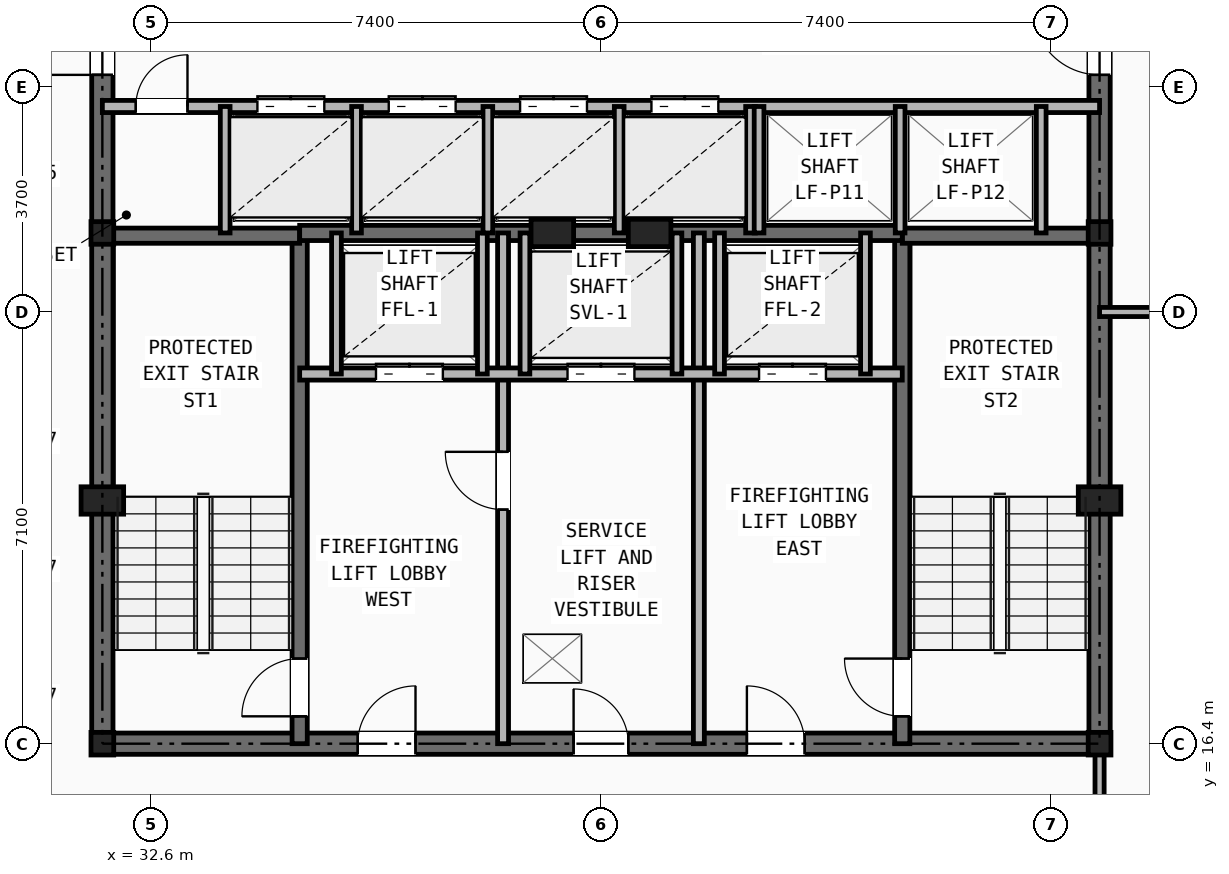
"""IFC4 building model, lengths in metres.
Left out: names, types, materials, properties, quantities, classifications, styles, units other than length and angle.
Written with IfcOpenShell. Run it as: python <this file> out.ifc"""

import sys

from ifc_helpers import new_model, si_unit, direction, frame, frame_2d, origin, origin_2d, place, context, subcontext, project, spatial, rectangle, i_section, extrude, element, fill, save


model = new_model("IFC4")
c1 = context("Model", 3, precision=1e-05, world=origin(), true_north=direction((0.0, 1.0)))
c2 = subcontext(c1, "Body", "Model", "MODEL_VIEW")
j1 = project(units=[si_unit("LENGTHUNIT", "METRE"), si_unit("PLANEANGLEUNIT", "RADIAN")], contexts=[c1])
p1 = place(None, origin())
s1 = spatial("IfcSite", under=j1, at=p1, CompositionType="ELEMENT")
p2 = place(p1, origin())
s2 = spatial("IfcBuilding", under=s1, at=p2, CompositionType="ELEMENT")
p3 = place(p2, frame((0.0, 0.0, 147.05)))
s3 = spatial("IfcBuildingStorey", under=s2, at=p3, CompositionType="ELEMENT", Elevation=147.05)
for number, where, z_axis, x_axis in (
    (1, (31.8, 16.4, 0.0), (0.0, 0.0, 1.0), (1.0, 0.0, 0.0)),
    (2, (48.2, 16.4, 0.0), (0.0, 0.0, 1.0), (1.0, 0.0, 0.0)),
    (3, (31.8, 24.8, 0.0), (0.0, 0.0, 1.0), (1.0, 0.0, 0.0)),
    (4, (48.2, 24.8, 0.0), (0.0, 0.0, 1.0), (1.0, 0.0, 0.0)),
):
    element("IfcColumn", number, at=place(p3, frame(where, z_axis=z_axis, x_axis=x_axis)), inside=s3, PredefinedType="COLUMN", context=c2, shape_type="SweptSolid", body=[
        extrude(i_section(OverallWidth=0.374, OverallDepth=0.372, WebThickness=0.016, FlangeThickness=0.026, at=origin_2d()), origin(), (0.0, 0.0, 1.0), 3.45),
    ])
for number, where, z_axis, x_axis in (
    (5, (31.8, 20.4, 0.0), (0.0, 0.0, 1.0), (1.0, 0.0, 0.0)),
    (6, (48.2, 20.4, 0.0), (0.0, 0.0, 1.0), (1.0, 0.0, 0.0)),
    (7, (39.2, 24.8, 0.0), (0.0, 0.0, 1.0), (1.0, 0.0, 0.0)),
    (8, (40.8, 24.8, 0.0), (0.0, 0.0, 1.0), (1.0, 0.0, 0.0)),
):
    element("IfcColumn", number, at=place(p3, frame(where, z_axis=z_axis, x_axis=x_axis)), inside=s3, PredefinedType="PILASTER", context=c2, shape_type="SweptSolid", body=[
        extrude(rectangle(XDim=0.7, YDim=0.45, at=origin_2d()), origin(), (0.0, 0.0, 1.0), 3.45),
    ])
p4 = place(p3, frame((31.8, 16.4, 0.0), z_axis=(0.0, 0.0, 1.0), x_axis=(1.0, 0.0, 0.0)))
e9 = element("IfcWall", 9, at=p4, inside=s3, PredefinedType="SHEAR", context=c2, shape_type="SweptSolid", body=[
    extrude(rectangle(XDim=16.4, YDim=0.35, at=frame_2d((8.2, 0.0))), origin(), (0.0, 0.0, 1.0), 3.21),
])
p5 = place(p4, frame((7.75, 0.0, 0.0)))
e10 = element("IfcOpeningElement", 10, at=p5, cuts=e9, PredefinedType="OPENING", context=c2, shape_type="SweptSolid", body=[
    extrude(rectangle(XDim=0.9, YDim=2.1, at=frame_2d((0.45, 1.05))), frame((0.0, 0.185, 0.0), z_axis=(0.0, -1.0, 0.0), x_axis=(1.0, 0.0, 0.0)), (0.0, 0.0, 1.0), 0.37),
])
p6 = place(p4, frame((4.2, 0.0, 0.0)))
e11 = element("IfcOpeningElement", 11, at=p6, cuts=e9, PredefinedType="OPENING", context=c2, shape_type="SweptSolid", body=[
    extrude(rectangle(XDim=0.95, YDim=2.1, at=frame_2d((0.475, 1.05))), frame((0.0, 0.185, 0.0), z_axis=(0.0, -1.0, 0.0), x_axis=(1.0, 0.0, 0.0)), (0.0, 0.0, 1.0), 0.37),
])
p7 = place(p4, frame((10.6, 0.0, 0.0)))
e12 = element("IfcOpeningElement", 12, at=p7, cuts=e9, PredefinedType="OPENING", context=c2, shape_type="SweptSolid", body=[
    extrude(rectangle(XDim=0.95, YDim=2.1, at=frame_2d((0.475, 1.05))), frame((0.0, 0.185, 0.0), z_axis=(0.0, -1.0, 0.0), x_axis=(1.0, 0.0, 0.0)), (0.0, 0.0, 1.0), 0.37),
])
p8 = place(p3, frame((31.8, 16.4, 0.0), z_axis=(0.0, 0.0, 1.0), x_axis=(0.0, 1.0, 0.0)))
e13 = element("IfcWall", 13, at=p8, inside=s3, PredefinedType="SHEAR", context=c2, shape_type="SweptSolid", body=[
    extrude(rectangle(XDim=14.8, YDim=0.35, at=frame_2d((7.4, 0.0))), origin(), (0.0, 0.0, 1.0), 3.21),
])
p9 = place(p8, frame((11.0, 0.0, 0.0)))
e14 = element("IfcOpeningElement", 14, at=p9, cuts=e13, PredefinedType="OPENING", context=c2, shape_type="SweptSolid", body=[
    extrude(rectangle(XDim=1.1, YDim=2.15, at=frame_2d((0.55, 1.075))), frame((0.0, 0.185, 0.0), z_axis=(0.0, -1.0, 0.0), x_axis=(1.0, 0.0, 0.0)), (0.0, 0.0, 1.0), 0.37),
])
p10 = place(p3, frame((48.2, 16.4, 0.0), z_axis=(0.0, 0.0, 1.0), x_axis=(0.0, 1.0, 0.0)))
e15 = element("IfcWall", 15, at=p10, inside=s3, PredefinedType="SHEAR", context=c2, shape_type="SweptSolid", body=[
    extrude(rectangle(XDim=14.8, YDim=0.35, at=frame_2d((7.4, 0.0))), origin(), (0.0, 0.0, 1.0), 3.21),
])
p11 = place(p10, frame((11.0, 0.0, 0.0)))
e16 = element("IfcOpeningElement", 16, at=p11, cuts=e15, PredefinedType="OPENING", context=c2, shape_type="SweptSolid", body=[
    extrude(rectangle(XDim=1.1, YDim=2.15, at=frame_2d((0.55, 1.075))), frame((0.0, 0.185, 0.0), z_axis=(0.0, -1.0, 0.0), x_axis=(1.0, 0.0, 0.0)), (0.0, 0.0, 1.0), 0.37),
])
p12 = place(p3, frame((35.045, 16.4, 0.0), z_axis=(0.0, 0.0, 1.0), x_axis=(0.0, 1.0, 0.0)))
e17 = element("IfcWall", 17, at=p12, inside=s3, PredefinedType="SHEAR", context=c2, shape_type="SweptSolid", body=[
    extrude(rectangle(XDim=8.4, YDim=0.25, at=frame_2d((4.2, 0.0))), origin(), (0.0, 0.0, 1.0), 3.21),
])
p13 = place(p12, frame((0.45, 0.0, 0.0)))
e18 = element("IfcOpeningElement", 18, at=p13, cuts=e17, PredefinedType="OPENING", context=c2, shape_type="SweptSolid", body=[
    extrude(rectangle(XDim=0.95, YDim=2.1, at=frame_2d((0.475, 1.05))), frame((0.0, 0.135, 0.0), z_axis=(0.0, -1.0, 0.0), x_axis=(1.0, 0.0, 0.0)), (0.0, 0.0, 1.0), 0.27),
])
p14 = place(p3, frame((31.8, 24.755, 0.0), z_axis=(0.0, 0.0, 1.0), x_axis=(1.0, 0.0, 0.0)))
e19 = element("IfcWall", 19, at=p14, inside=s3, PredefinedType="SHEAR", context=c2, shape_type="SweptSolid", body=[
    extrude(rectangle(XDim=3.245, YDim=0.25, at=frame_2d((1.623, 0.0))), origin(), (0.0, 0.0, 1.0), 3.21),
])
p15 = place(p3, frame((44.955, 16.4, 0.0), z_axis=(0.0, 0.0, 1.0), x_axis=(0.0, 1.0, 0.0)))
e20 = element("IfcWall", 20, at=p15, inside=s3, PredefinedType="SHEAR", context=c2, shape_type="SweptSolid", body=[
    extrude(rectangle(XDim=8.4, YDim=0.25, at=frame_2d((4.2, 0.0))), origin(), (0.0, 0.0, 1.0), 3.21),
])
p16 = place(p15, frame((0.45, 0.0, 0.0)))
e21 = element("IfcOpeningElement", 21, at=p16, cuts=e20, PredefinedType="OPENING", context=c2, shape_type="SweptSolid", body=[
    extrude(rectangle(XDim=0.95, YDim=2.1, at=frame_2d((0.475, 1.05))), frame((0.0, 0.135, 0.0), z_axis=(0.0, -1.0, 0.0), x_axis=(1.0, 0.0, 0.0)), (0.0, 0.0, 1.0), 0.27),
])
p17 = place(p3, frame((44.955, 24.755, 0.0), z_axis=(0.0, 0.0, 1.0), x_axis=(1.0, 0.0, 0.0)))
e22 = element("IfcWall", 22, at=p17, inside=s3, PredefinedType="SHEAR", context=c2, shape_type="SweptSolid", body=[
    extrude(rectangle(XDim=3.245, YDim=0.25, at=frame_2d((1.623, 0.0))), origin(), (0.0, 0.0, 1.0), 3.21),
])
p18 = place(p3, frame((35.045, 24.8, 0.0), z_axis=(0.0, 0.0, 1.0), x_axis=(1.0, 0.0, 0.0)))
e23 = element("IfcWall", 23, at=p18, inside=s3, PredefinedType="SHEAR", context=c2, shape_type="SweptSolid", body=[
    extrude(rectangle(XDim=9.91, YDim=0.25, at=frame_2d((4.955, 0.0))), origin(), (0.0, 0.0, 1.0), 3.21),
])
p19 = place(p3, frame((38.39, 16.4, 0.0), z_axis=(0.0, 0.0, 1.0), x_axis=(0.0, 1.0, 0.0)))
e24 = element("IfcWall", 24, at=p19, inside=s3, PredefinedType="PARTITIONING", context=c2, shape_type="SweptSolid", body=[
    extrude(rectangle(XDim=8.4, YDim=0.18, at=frame_2d((4.2, 0.0))), origin(), (0.0, 0.0, 1.0), 2.661),
])
p20 = place(p19, frame((3.85, 0.0, 0.0)))
e25 = element("IfcOpeningElement", 25, at=p20, cuts=e24, PredefinedType="OPENING", context=c2, shape_type="SweptSolid", body=[
    extrude(rectangle(XDim=0.95, YDim=2.1, at=frame_2d((0.475, 1.05))), frame((0.0, 0.1, 0.0), z_axis=(0.0, -1.0, 0.0), x_axis=(1.0, 0.0, 0.0)), (0.0, 0.0, 1.0), 0.2),
])
p21 = place(p3, frame((41.61, 16.4, 0.0), z_axis=(0.0, 0.0, 1.0), x_axis=(0.0, 1.0, 0.0)))
e26 = element("IfcWall", 26, at=p21, inside=s3, PredefinedType="PARTITIONING", context=c2, shape_type="SweptSolid", body=[
    extrude(rectangle(XDim=8.4, YDim=0.18, at=frame_2d((4.2, 0.0))), origin(), (0.0, 0.0, 1.0), 2.661),
])
p22 = place(p3, frame((35.045, 22.48, 0.0), z_axis=(0.0, 0.0, 1.0), x_axis=(1.0, 0.0, 0.0)))
e27 = element("IfcWall", 27, at=p22, inside=s3, PredefinedType="SOLIDWALL", context=c2, shape_type="SweptSolid", body=[
    extrude(rectangle(XDim=9.91, YDim=0.2, at=frame_2d((4.955, 0.0))), origin(), (0.0, 0.0, 1.0), 3.21),
])
p23 = place(p22, frame((1.255, 0.0, 0.0)))
e28 = element("IfcOpeningElement", 28, at=p23, cuts=e27, PredefinedType="OPENING", context=c2, shape_type="SweptSolid", body=[
    extrude(rectangle(XDim=1.1, YDim=2.15, at=frame_2d((0.55, 1.075))), frame((0.0, 0.11, 0.0), z_axis=(0.0, -1.0, 0.0), x_axis=(1.0, 0.0, 0.0)), (0.0, 0.0, 1.0), 0.22),
])
p24 = place(p22, frame((7.555, 0.0, 0.0)))
e29 = element("IfcOpeningElement", 29, at=p24, cuts=e27, PredefinedType="OPENING", context=c2, shape_type="SweptSolid", body=[
    extrude(rectangle(XDim=1.1, YDim=2.15, at=frame_2d((0.55, 1.075))), frame((0.0, 0.11, 0.0), z_axis=(0.0, -1.0, 0.0), x_axis=(1.0, 0.0, 0.0)), (0.0, 0.0, 1.0), 0.22),
])
p25 = place(p22, frame((4.405, 0.0, 0.0)))
e30 = element("IfcOpeningElement", 30, at=p25, cuts=e27, PredefinedType="OPENING", context=c2, shape_type="SweptSolid", body=[
    extrude(rectangle(XDim=1.1, YDim=2.15, at=frame_2d((0.55, 1.075))), frame((0.0, 0.11, 0.0), z_axis=(0.0, -1.0, 0.0), x_axis=(1.0, 0.0, 0.0)), (0.0, 0.0, 1.0), 0.22),
])
for number, where, z_axis, x_axis in (
    (31, (35.65, 22.48, 0.0), (0.0, 0.0, 1.0), (0.0, 1.0, 0.0)),
    (32, (38.05, 22.48, 0.0), (0.0, 0.0, 1.0), (0.0, 1.0, 0.0)),
    (33, (41.95, 22.48, 0.0), (0.0, 0.0, 1.0), (0.0, 1.0, 0.0)),
    (34, (44.35, 22.48, 0.0), (0.0, 0.0, 1.0), (0.0, 1.0, 0.0)),
    (35, (38.75, 22.48, 0.0), (0.0, 0.0, 1.0), (0.0, 1.0, 0.0)),
    (36, (41.25, 22.48, 0.0), (0.0, 0.0, 1.0), (0.0, 1.0, 0.0)),
):
    element("IfcWall", number, at=place(p3, frame(where, z_axis=z_axis, x_axis=x_axis)), inside=s3, PredefinedType="SOLIDWALL", context=c2, shape_type="SweptSolid", body=[
        extrude(rectangle(XDim=2.32, YDim=0.16, at=frame_2d((1.16, 0.0))), origin(), (0.0, 0.0, 1.0), 3.21),
    ])
p26 = place(p3, frame((31.8, 26.88, 0.0), z_axis=(0.0, 0.0, 1.0), x_axis=(1.0, 0.0, 0.0)))
e37 = element("IfcWall", 37, at=p26, inside=s3, PredefinedType="SOLIDWALL", context=c2, shape_type="SweptSolid", body=[
    extrude(rectangle(XDim=16.4, YDim=0.2, at=frame_2d((8.2, 0.0))), origin(), (0.0, 0.0, 1.0), 2.661),
])
p27 = place(p26, frame((0.55, 0.0, 0.0)))
e38 = element("IfcOpeningElement", 38, at=p27, cuts=e37, PredefinedType="OPENING", context=c2, shape_type="SweptSolid", body=[
    extrude(rectangle(XDim=0.85, YDim=2.05, at=frame_2d((0.425, 1.025))), frame((0.0, 0.11, 0.0), z_axis=(0.0, -1.0, 0.0), x_axis=(1.0, 0.0, 0.0)), (0.0, 0.0, 1.0), 0.22),
])
p28 = place(p26, frame((2.55, 0.0, 0.0)))
e39 = element("IfcOpeningElement", 39, at=p28, cuts=e37, PredefinedType="OPENING", context=c2, shape_type="SweptSolid", body=[
    extrude(rectangle(XDim=1.1, YDim=2.15, at=frame_2d((0.55, 1.075))), frame((0.0, 0.11, 0.0), z_axis=(0.0, -1.0, 0.0), x_axis=(1.0, 0.0, 0.0)), (0.0, 0.0, 1.0), 0.22),
])
p29 = place(p26, frame((4.71, 0.0, 0.0)))
e40 = element("IfcOpeningElement", 40, at=p29, cuts=e37, PredefinedType="OPENING", context=c2, shape_type="SweptSolid", body=[
    extrude(rectangle(XDim=1.1, YDim=2.15, at=frame_2d((0.55, 1.075))), frame((0.0, 0.11, 0.0), z_axis=(0.0, -1.0, 0.0), x_axis=(1.0, 0.0, 0.0)), (0.0, 0.0, 1.0), 0.22),
])
p30 = place(p26, frame((6.87, 0.0, 0.0)))
e41 = element("IfcOpeningElement", 41, at=p30, cuts=e37, PredefinedType="OPENING", context=c2, shape_type="SweptSolid", body=[
    extrude(rectangle(XDim=1.1, YDim=2.15, at=frame_2d((0.55, 1.075))), frame((0.0, 0.11, 0.0), z_axis=(0.0, -1.0, 0.0), x_axis=(1.0, 0.0, 0.0)), (0.0, 0.0, 1.0), 0.22),
])
p31 = place(p26, frame((9.03, 0.0, 0.0)))
e42 = element("IfcOpeningElement", 42, at=p31, cuts=e37, PredefinedType="OPENING", context=c2, shape_type="SweptSolid", body=[
    extrude(rectangle(XDim=1.1, YDim=2.15, at=frame_2d((0.55, 1.075))), frame((0.0, 0.11, 0.0), z_axis=(0.0, -1.0, 0.0), x_axis=(1.0, 0.0, 0.0)), (0.0, 0.0, 1.0), 0.22),
])
for number, where, z_axis, x_axis in (
    (43, (33.82, 24.8, 0.0), (0.0, 0.0, 1.0), (0.0, 1.0, 0.0)),
    (44, (35.98, 24.8, 0.0), (0.0, 0.0, 1.0), (0.0, 1.0, 0.0)),
    (45, (38.14, 24.8, 0.0), (0.0, 0.0, 1.0), (0.0, 1.0, 0.0)),
    (46, (40.3, 24.8, 0.0), (0.0, 0.0, 1.0), (0.0, 1.0, 0.0)),
    (47, (42.46, 24.8, 0.0), (0.0, 0.0, 1.0), (0.0, 1.0, 0.0)),
    (48, (42.6, 24.8, 0.0), (0.0, 0.0, 1.0), (0.0, 1.0, 0.0)),
    (49, (44.92, 24.8, 0.0), (0.0, 0.0, 1.0), (0.0, 1.0, 0.0)),
    (50, (47.24, 24.8, 0.0), (0.0, 0.0, 1.0), (0.0, 1.0, 0.0)),
):
    element("IfcWall", number, at=place(p3, frame(where, z_axis=z_axis, x_axis=x_axis)), inside=s3, PredefinedType="SOLIDWALL", context=c2, shape_type="SweptSolid", body=[
        extrude(rectangle(XDim=2.08, YDim=0.16, at=frame_2d((1.04, 0.0))), origin(), (0.0, 0.0, 1.0), 3.21),
    ])
p32 = place(p3, frame((48.2, 14.1, 0.0), z_axis=(0.0, 0.0, 1.0), x_axis=(0.0, 1.0, 0.0)))
e51 = element("IfcWall", 51, at=p32, inside=s3, PredefinedType="PARTITIONING", context=c2, shape_type="SweptSolid", body=[
    extrude(rectangle(XDim=2.3, YDim=0.15, at=frame_2d((1.15, 0.0))), origin(), (0.0, 0.0, 1.0), 2.661),
])
p33 = place(p3, frame((48.2, 23.5, 0.0), z_axis=(0.0, 0.0, 1.0), x_axis=(1.0, 0.0, 0.0)))
e52 = element("IfcWall", 52, at=p33, inside=s3, PredefinedType="PARTITIONING", context=c2, shape_type="SweptSolid", body=[
    extrude(rectangle(XDim=12.933, YDim=0.15, at=frame_2d((6.467, 0.0))), origin(), (0.0, 0.0, 1.0), 2.589),
])
p34 = place(p33, frame((1.4, 0.0, 0.0)))
e53 = element("IfcOpeningElement", 53, at=p34, cuts=e52, PredefinedType="OPENING", context=c2, shape_type="SweptSolid", body=[
    extrude(rectangle(XDim=0.95, YDim=2.1, at=frame_2d((0.475, 1.05))), frame((0.0, 0.085, 0.0), z_axis=(0.0, -1.0, 0.0), x_axis=(1.0, 0.0, 0.0)), (0.0, 0.0, 1.0), 0.17),
])
p35 = place(p5, origin())
e54 = element("IfcDoor", 54, at=p35, inside=s3, OperationType="SINGLE_SWING_LEFT", PredefinedType="DOOR", context=c2, shape_type="SweptSolid", body=[
    extrude(rectangle(XDim=0.9, YDim=2.1, at=frame_2d((0.45, 1.05))), frame((0.0, 0.025, 0.0), z_axis=(0.0, -1.0, 0.0), x_axis=(1.0, 0.0, 0.0)), (0.0, 0.0, 1.0), 0.05),
])
fill(e10, e54)
p36 = place(p20, origin())
e55 = element("IfcDoor", 55, at=p36, inside=s3, OperationType="SINGLE_SWING_RIGHT", PredefinedType="DOOR", context=c2, shape_type="SweptSolid", body=[
    extrude(rectangle(XDim=0.95, YDim=2.1, at=frame_2d((0.475, 1.05))), frame((0.0, 0.025, 0.0), z_axis=(0.0, -1.0, 0.0), x_axis=(1.0, 0.0, 0.0)), (0.0, 0.0, 1.0), 0.05),
])
fill(e25, e55)
p37 = place(p13, origin())
e56 = element("IfcDoor", 56, at=p37, inside=s3, OperationType="SINGLE_SWING_LEFT", PredefinedType="DOOR", context=c2, shape_type="SweptSolid", body=[
    extrude(rectangle(XDim=0.95, YDim=2.1, at=frame_2d((0.475, 1.05))), frame((0.0, 0.025, 0.0), z_axis=(0.0, -1.0, 0.0), x_axis=(1.0, 0.0, 0.0)), (0.0, 0.0, 1.0), 0.05),
])
fill(e18, e56)
p38 = place(p16, origin())
e57 = element("IfcDoor", 57, at=p38, inside=s3, OperationType="SINGLE_SWING_RIGHT", PredefinedType="DOOR", context=c2, shape_type="SweptSolid", body=[
    extrude(rectangle(XDim=0.95, YDim=2.1, at=frame_2d((0.475, 1.05))), frame((0.0, 0.025, 0.0), z_axis=(0.0, -1.0, 0.0), x_axis=(1.0, 0.0, 0.0)), (0.0, 0.0, 1.0), 0.05),
])
fill(e21, e57)
p39 = place(p6, origin())
e58 = element("IfcDoor", 58, at=p39, inside=s3, OperationType="SINGLE_SWING_RIGHT", PredefinedType="DOOR", context=c2, shape_type="SweptSolid", body=[
    extrude(rectangle(XDim=0.95, YDim=2.1, at=frame_2d((0.475, 1.05))), frame((0.0, 0.025, 0.0), z_axis=(0.0, -1.0, 0.0), x_axis=(1.0, 0.0, 0.0)), (0.0, 0.0, 1.0), 0.05),
])
fill(e11, e58)
p40 = place(p7, origin())
e59 = element("IfcDoor", 59, at=p40, inside=s3, OperationType="SINGLE_SWING_LEFT", PredefinedType="DOOR", context=c2, shape_type="SweptSolid", body=[
    extrude(rectangle(XDim=0.95, YDim=2.1, at=frame_2d((0.475, 1.05))), frame((0.0, 0.025, 0.0), z_axis=(0.0, -1.0, 0.0), x_axis=(1.0, 0.0, 0.0)), (0.0, 0.0, 1.0), 0.05),
])
fill(e12, e59)
p41 = place(p23, origin())
e60 = element("IfcDoor", 60, at=p41, inside=s3, OperationType="DOUBLE_DOOR_SLIDING", PredefinedType="DOOR", context=c2, shape_type="SweptSolid", body=[
    extrude(rectangle(XDim=1.1, YDim=2.15, at=frame_2d((0.55, 1.075))), frame((0.0, 0.025, 0.0), z_axis=(0.0, -1.0, 0.0), x_axis=(1.0, 0.0, 0.0)), (0.0, 0.0, 1.0), 0.05),
])
fill(e28, e60)
p42 = place(p24, origin())
e61 = element("IfcDoor", 61, at=p42, inside=s3, OperationType="DOUBLE_DOOR_SLIDING", PredefinedType="DOOR", context=c2, shape_type="SweptSolid", body=[
    extrude(rectangle(XDim=1.1, YDim=2.15, at=frame_2d((0.55, 1.075))), frame((0.0, 0.025, 0.0), z_axis=(0.0, -1.0, 0.0), x_axis=(1.0, 0.0, 0.0)), (0.0, 0.0, 1.0), 0.05),
])
fill(e29, e61)
p43 = place(p25, origin())
e62 = element("IfcDoor", 62, at=p43, inside=s3, OperationType="DOUBLE_DOOR_SLIDING", PredefinedType="DOOR", context=c2, shape_type="SweptSolid", body=[
    extrude(rectangle(XDim=1.1, YDim=2.15, at=frame_2d((0.55, 1.075))), frame((0.0, 0.025, 0.0), z_axis=(0.0, -1.0, 0.0), x_axis=(1.0, 0.0, 0.0)), (0.0, 0.0, 1.0), 0.05),
])
fill(e30, e62)
p44 = place(p27, origin())
e63 = element("IfcDoor", 63, at=p44, inside=s3, OperationType="SINGLE_SWING_RIGHT", PredefinedType="DOOR", context=c2, shape_type="SweptSolid", body=[
    extrude(rectangle(XDim=0.85, YDim=2.05, at=frame_2d((0.425, 1.025))), frame((0.0, 0.025, 0.0), z_axis=(0.0, -1.0, 0.0), x_axis=(1.0, 0.0, 0.0)), (0.0, 0.0, 1.0), 0.05),
])
fill(e38, e63)
p45 = place(p9, origin())
e64 = element("IfcDoor", 64, at=p45, inside=s3, OperationType="SINGLE_SWING_LEFT", PredefinedType="DOOR", context=c2, shape_type="SweptSolid", body=[
    extrude(rectangle(XDim=1.1, YDim=2.15, at=frame_2d((0.55, 1.075))), frame((0.0, 0.025, 0.0), z_axis=(0.0, -1.0, 0.0), x_axis=(1.0, 0.0, 0.0)), (0.0, 0.0, 1.0), 0.05),
])
fill(e14, e64)
p46 = place(p11, origin())
e65 = element("IfcDoor", 65, at=p46, inside=s3, OperationType="SINGLE_SWING_RIGHT", PredefinedType="DOOR", context=c2, shape_type="SweptSolid", body=[
    extrude(rectangle(XDim=1.1, YDim=2.15, at=frame_2d((0.55, 1.075))), frame((0.0, 0.025, 0.0), z_axis=(0.0, -1.0, 0.0), x_axis=(1.0, 0.0, 0.0)), (0.0, 0.0, 1.0), 0.05),
])
fill(e16, e65)
p47 = place(p28, origin())
e66 = element("IfcDoor", 66, at=p47, inside=s3, OperationType="DOUBLE_DOOR_SLIDING", PredefinedType="DOOR", context=c2, shape_type="SweptSolid", body=[
    extrude(rectangle(XDim=1.1, YDim=2.15, at=frame_2d((0.55, 1.075))), frame((0.0, 0.025, 0.0), z_axis=(0.0, -1.0, 0.0), x_axis=(1.0, 0.0, 0.0)), (0.0, 0.0, 1.0), 0.05),
])
fill(e39, e66)
p48 = place(p29, origin())
e67 = element("IfcDoor", 67, at=p48, inside=s3, OperationType="DOUBLE_DOOR_SLIDING", PredefinedType="DOOR", context=c2, shape_type="SweptSolid", body=[
    extrude(rectangle(XDim=1.1, YDim=2.15, at=frame_2d((0.55, 1.075))), frame((0.0, 0.025, 0.0), z_axis=(0.0, -1.0, 0.0), x_axis=(1.0, 0.0, 0.0)), (0.0, 0.0, 1.0), 0.05),
])
fill(e40, e67)
p49 = place(p30, origin())
e68 = element("IfcDoor", 68, at=p49, inside=s3, OperationType="DOUBLE_DOOR_SLIDING", PredefinedType="DOOR", context=c2, shape_type="SweptSolid", body=[
    extrude(rectangle(XDim=1.1, YDim=2.15, at=frame_2d((0.55, 1.075))), frame((0.0, 0.025, 0.0), z_axis=(0.0, -1.0, 0.0), x_axis=(1.0, 0.0, 0.0)), (0.0, 0.0, 1.0), 0.05),
])
fill(e41, e68)
p50 = place(p31, origin())
e69 = element("IfcDoor", 69, at=p50, inside=s3, OperationType="DOUBLE_DOOR_SLIDING", PredefinedType="DOOR", context=c2, shape_type="SweptSolid", body=[
    extrude(rectangle(XDim=1.1, YDim=2.15, at=frame_2d((0.55, 1.075))), frame((0.0, 0.025, 0.0), z_axis=(0.0, -1.0, 0.0), x_axis=(1.0, 0.0, 0.0)), (0.0, 0.0, 1.0), 0.05),
])
fill(e42, e69)
save(model, sys.argv[1])
